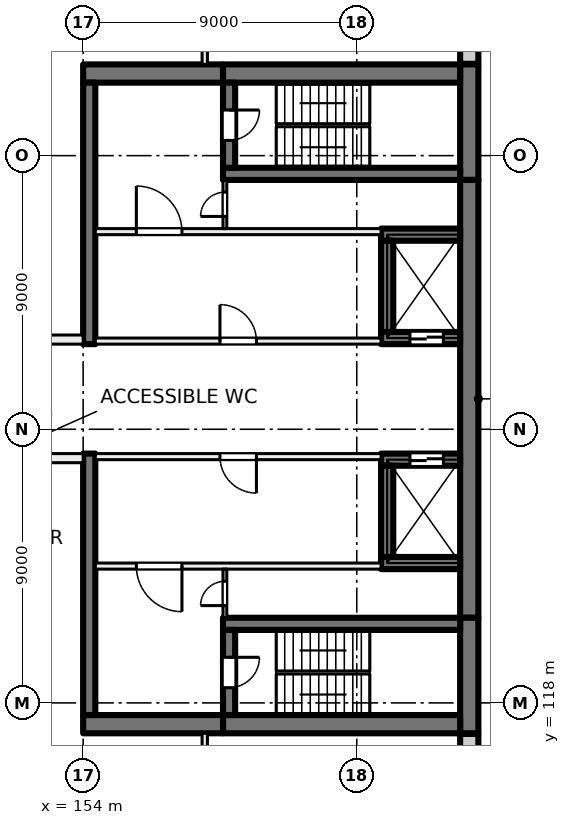
"""IFC4 building model, lengths in metres.
Left out: names, types, materials, properties, quantities, classifications, styles, units other than length and angle.
Written with IfcOpenShell. Run it as: python <this file> out.ifc"""

import sys

from ifc_helpers import new_model, si_unit, direction, frame, frame_2d, origin, place, context, subcontext, project, spatial, rectangle, extrude, element, fill, save


model = new_model("IFC4")
c1 = context("Model", 3, precision=1e-05, world=origin(), true_north=direction((0.0, 1.0)))
c2 = subcontext(c1, "Body", "Model", "MODEL_VIEW")
j1 = project(units=[si_unit("LENGTHUNIT", "METRE"), si_unit("PLANEANGLEUNIT", "RADIAN")], contexts=[c1])
p1 = place(None, origin())
s1 = spatial("IfcSite", under=j1, at=p1, CompositionType="ELEMENT")
p2 = place(p1, origin())
s2 = spatial("IfcBuilding", under=s1, at=p2, CompositionType="ELEMENT")
p3 = place(p2, frame((0.0, 0.0, 67.5)))
s3 = spatial("IfcBuildingStorey", under=s2, at=p3, CompositionType="ELEMENT", Elevation=67.5)
p4 = place(p3, frame((166.7, 139.0, 0.0), z_axis=(0.0, 0.0, 1.0), x_axis=(0.0, -1.0, 0.0)))
e1 = element("IfcWall", 1, at=p4, inside=s3, PredefinedType="SHEAR", context=c2, shape_type="SweptSolid", body=[
    extrude(rectangle(XDim=3.8, YDim=0.6, at=frame_2d((1.9, 0.0))), origin(), (0.0, 0.0, 1.0), 4.0),
])
p5 = place(p3, frame((166.7, 135.2, 0.0), z_axis=(0.0, 0.0, 1.0), x_axis=(0.0, -1.0, 0.0)))
e2 = element("IfcWall", 2, at=p5, inside=s3, PredefinedType="SHEAR", context=c2, shape_type="SweptSolid", body=[
    extrude(rectangle(XDim=14.4, YDim=0.6, at=frame_2d((7.2, 0.0))), origin(), (0.0, 0.0, 1.0), 4.0),
])
p6 = place(p3, frame((166.7, 120.8, 0.0), z_axis=(0.0, 0.0, 1.0), x_axis=(0.0, -1.0, 0.0)))
e3 = element("IfcWall", 3, at=p6, inside=s3, PredefinedType="SHEAR", context=c2, shape_type="SweptSolid", body=[
    extrude(rectangle(XDim=3.8, YDim=0.6, at=frame_2d((1.9, 0.0))), origin(), (0.0, 0.0, 1.0), 4.0),
])
for number, where, z_axis, x_axis in (
    (4, (166.4, 138.7, 0.0), (0.0, 0.0, 1.0), (-1.0, 0.0, 0.0)),
    (5, (166.4, 117.3, 0.0), (0.0, 0.0, 1.0), (-1.0, 0.0, 0.0)),
):
    element("IfcWall", number, at=place(p3, frame(where, z_axis=z_axis, x_axis=x_axis)), inside=s3, PredefinedType="SHEAR", context=c2, shape_type="SweptSolid", body=[
        extrude(rectangle(XDim=7.8, YDim=0.6, at=frame_2d((3.9, 0.0))), origin(), (0.0, 0.0, 1.0), 4.0),
    ])
for number, where, z_axis, x_axis in (
    (6, (158.6, 138.7, 0.0), (0.0, 0.0, 1.0), (-1.0, 0.0, 0.0)),
    (7, (158.6, 117.3, 0.0), (0.0, 0.0, 1.0), (-1.0, 0.0, 0.0)),
):
    element("IfcWall", number, at=place(p3, frame(where, z_axis=z_axis, x_axis=x_axis)), inside=s3, PredefinedType="SHEAR", context=c2, shape_type="SweptSolid", body=[
        extrude(rectangle(XDim=4.6, YDim=0.6, at=frame_2d((2.3, 0.0))), origin(), (0.0, 0.0, 1.0), 4.0),
    ])
p7 = place(p3, frame((166.4, 135.4, 0.0), z_axis=(0.0, 0.0, 1.0), x_axis=(-1.0, 0.0, 0.0)))
e8 = element("IfcWall", 8, at=p7, inside=s3, PredefinedType="SHEAR", context=c2, shape_type="SweptSolid", body=[
    extrude(rectangle(XDim=7.8, YDim=0.4, at=frame_2d((3.9, 0.0))), origin(), (0.0, 0.0, 1.0), 4.0),
])
p8 = place(p3, frame((158.8, 138.4, 0.0), z_axis=(0.0, 0.0, 1.0), x_axis=(0.0, -1.0, 0.0)))
e9 = element("IfcWall", 9, at=p8, inside=s3, PredefinedType="SHEAR", context=c2, shape_type="SweptSolid", body=[
    extrude(rectangle(XDim=2.8, YDim=0.4, at=frame_2d((1.4, 0.0))), origin(), (0.0, 0.0, 1.0), 4.0),
])
p9 = place(p8, frame((0.9, 0.0, 0.0)))
e10 = element("IfcOpeningElement", 10, at=p9, cuts=e9, PredefinedType="OPENING", context=c2, shape_type="SweptSolid", body=[
    extrude(rectangle(XDim=1.0, YDim=2.1, at=frame_2d((0.5, 1.05))), frame((0.0, 0.21, 0.0), z_axis=(0.0, -1.0, 0.0), x_axis=(1.0, 0.0, 0.0)), (0.0, 0.0, 1.0), 0.42),
])
p10 = place(p3, frame((166.4, 120.6, 0.0), z_axis=(0.0, 0.0, 1.0), x_axis=(-1.0, 0.0, 0.0)))
e11 = element("IfcWall", 11, at=p10, inside=s3, PredefinedType="SHEAR", context=c2, shape_type="SweptSolid", body=[
    extrude(rectangle(XDim=7.8, YDim=0.4, at=frame_2d((3.9, 0.0))), origin(), (0.0, 0.0, 1.0), 4.0),
])
p11 = place(p3, frame((158.8, 120.4, 0.0), z_axis=(0.0, 0.0, 1.0), x_axis=(0.0, -1.0, 0.0)))
e12 = element("IfcWall", 12, at=p11, inside=s3, PredefinedType="SHEAR", context=c2, shape_type="SweptSolid", body=[
    extrude(rectangle(XDim=2.8, YDim=0.4, at=frame_2d((1.4, 0.0))), origin(), (0.0, 0.0, 1.0), 4.0),
])
p12 = place(p11, frame((0.9, 0.0, 0.0)))
e13 = element("IfcOpeningElement", 13, at=p12, cuts=e12, PredefinedType="OPENING", context=c2, shape_type="SweptSolid", body=[
    extrude(rectangle(XDim=1.0, YDim=2.1, at=frame_2d((0.5, 1.05))), frame((0.0, 0.21, 0.0), z_axis=(0.0, -1.0, 0.0), x_axis=(1.0, 0.0, 0.0)), (0.0, 0.0, 1.0), 0.42),
])
p13 = place(p3, frame((166.4, 130.0, 0.0), z_axis=(0.0, 0.0, 1.0), x_axis=(-1.0, 0.0, 0.0)))
e14 = element("IfcWall", 14, at=p13, inside=s3, PredefinedType="SHEAR", context=c2, shape_type="SweptSolid", body=[
    extrude(rectangle(XDim=2.6, YDim=0.4, at=frame_2d((1.3, 0.0))), origin(), (0.0, 0.0, 1.0), 4.0),
])
p14 = place(p13, frame((0.55, 0.0, 0.0)))
e15 = element("IfcOpeningElement", 15, at=p14, cuts=e14, PredefinedType="OPENING", context=c2, shape_type="SweptSolid", body=[
    extrude(rectangle(XDim=1.1, YDim=2.1, at=frame_2d((0.55, 1.05))), frame((0.0, 0.21, 0.0), z_axis=(0.0, -1.0, 0.0), x_axis=(1.0, 0.0, 0.0)), (0.0, 0.0, 1.0), 0.42),
])
p15 = place(p3, frame((166.4, 133.4, 0.0), z_axis=(0.0, 0.0, 1.0), x_axis=(-1.0, 0.0, 0.0)))
e16 = element("IfcWall", 16, at=p15, inside=s3, PredefinedType="SHEAR", context=c2, shape_type="SweptSolid", body=[
    extrude(rectangle(XDim=2.6, YDim=0.4, at=frame_2d((1.3, 0.0))), origin(), (0.0, 0.0, 1.0), 4.0),
])
p16 = place(p3, frame((164.0, 133.2, 0.0), z_axis=(0.0, 0.0, 1.0), x_axis=(0.0, -1.0, 0.0)))
e17 = element("IfcWall", 17, at=p16, inside=s3, PredefinedType="SHEAR", context=c2, shape_type="SweptSolid", body=[
    extrude(rectangle(XDim=3.0, YDim=0.4, at=frame_2d((1.5, 0.0))), origin(), (0.0, 0.0, 1.0), 4.0),
])
p17 = place(p3, frame((166.4, 126.0, 0.0), z_axis=(0.0, 0.0, 1.0), x_axis=(-1.0, 0.0, 0.0)))
e18 = element("IfcWall", 18, at=p17, inside=s3, PredefinedType="SHEAR", context=c2, shape_type="SweptSolid", body=[
    extrude(rectangle(XDim=2.6, YDim=0.4, at=frame_2d((1.3, 0.0))), origin(), (0.0, 0.0, 1.0), 4.0),
])
p18 = place(p17, frame((0.55, 0.0, 0.0)))
e19 = element("IfcOpeningElement", 19, at=p18, cuts=e18, PredefinedType="OPENING", context=c2, shape_type="SweptSolid", body=[
    extrude(rectangle(XDim=1.1, YDim=2.1, at=frame_2d((0.55, 1.05))), frame((0.0, 0.21, 0.0), z_axis=(0.0, -1.0, 0.0), x_axis=(1.0, 0.0, 0.0)), (0.0, 0.0, 1.0), 0.42),
])
p19 = place(p3, frame((166.4, 122.6, 0.0), z_axis=(0.0, 0.0, 1.0), x_axis=(-1.0, 0.0, 0.0)))
e20 = element("IfcWall", 20, at=p19, inside=s3, PredefinedType="SHEAR", context=c2, shape_type="SweptSolid", body=[
    extrude(rectangle(XDim=2.6, YDim=0.4, at=frame_2d((1.3, 0.0))), origin(), (0.0, 0.0, 1.0), 4.0),
])
p20 = place(p3, frame((164.0, 125.8, 0.0), z_axis=(0.0, 0.0, 1.0), x_axis=(0.0, -1.0, 0.0)))
e21 = element("IfcWall", 21, at=p20, inside=s3, PredefinedType="SHEAR", context=c2, shape_type="SweptSolid", body=[
    extrude(rectangle(XDim=3.0, YDim=0.4, at=frame_2d((1.5, 0.0))), origin(), (0.0, 0.0, 1.0), 4.0),
])
for number, where, z_axis, x_axis in (
    (22, (154.2, 138.4, 0.0), (0.0, 0.0, 1.0), (0.0, -1.0, 0.0)),
    (23, (154.2, 126.2, 0.0), (0.0, 0.0, 1.0), (0.0, -1.0, 0.0)),
):
    element("IfcWall", number, at=place(p3, frame(where, z_axis=z_axis, x_axis=x_axis)), inside=s3, PredefinedType="SHEAR", context=c2, shape_type="SweptSolid", body=[
        extrude(rectangle(XDim=8.6, YDim=0.4, at=frame_2d((4.3, 0.0))), origin(), (0.0, 0.0, 1.0), 4.0),
    ])
p21 = place(p3, frame((166.7, 116.98, 0.0), z_axis=(0.0, 0.0, 1.0), x_axis=(0.0, -1.0, 0.0)))
e24 = element("IfcWall", 24, at=p21, inside=s3, PredefinedType="SOLIDWALL", context=c2, shape_type="SweptSolid", body=[
    extrude(rectangle(XDim=2.98, YDim=0.6, at=frame_2d((1.49, 0.0))), origin(), (0.0, 0.0, 1.0), 3.625),
])
p22 = place(p3, frame((166.7, 141.93, 0.0), z_axis=(0.0, 0.0, 1.0), x_axis=(0.0, -1.0, 0.0)))
e25 = element("IfcWall", 25, at=p22, inside=s3, PredefinedType="SOLIDWALL", context=c2, shape_type="SweptSolid", body=[
    extrude(rectangle(XDim=2.91, YDim=0.6, at=frame_2d((1.455, 0.0))), origin(), (0.0, 0.0, 1.0), 3.625),
])
p23 = place(p3, frame((163.8, 126.1, 0.0), z_axis=(0.0, 0.0, 1.0), x_axis=(-1.0, 0.0, 0.0)))
e26 = element("IfcWall", 26, at=p23, inside=s3, PredefinedType="PARTITIONING", context=c2, shape_type="SweptSolid", body=[
    extrude(rectangle(XDim=9.4, YDim=0.2, at=frame_2d((4.7, 0.0))), origin(), (0.0, 0.0, 1.0), 3.625),
])
p24 = place(p23, frame((4.1, 0.0, 0.0)))
e27 = element("IfcOpeningElement", 27, at=p24, cuts=e26, PredefinedType="OPENING", context=c2, shape_type="SweptSolid", body=[
    extrude(rectangle(XDim=1.2, YDim=2.1, at=frame_2d((0.6, 1.05))), frame((0.0, 0.11, 0.0), z_axis=(0.0, -1.0, 0.0), x_axis=(1.0, 0.0, 0.0)), (0.0, 0.0, 1.0), 0.22),
])
p25 = place(p3, frame((163.8, 122.5, 0.0), z_axis=(0.0, 0.0, 1.0), x_axis=(-1.0, 0.0, 0.0)))
e28 = element("IfcWall", 28, at=p25, inside=s3, PredefinedType="PARTITIONING", context=c2, shape_type="SweptSolid", body=[
    extrude(rectangle(XDim=9.4, YDim=0.2, at=frame_2d((4.7, 0.0))), origin(), (0.0, 0.0, 1.0), 3.625),
])
p26 = place(p25, frame((6.55, 0.0, 0.0)))
e29 = element("IfcOpeningElement", 29, at=p26, cuts=e28, PredefinedType="OPENING", context=c2, shape_type="SweptSolid", body=[
    extrude(rectangle(XDim=1.5, YDim=2.1, at=frame_2d((0.75, 1.05))), frame((0.0, 0.11, 0.0), z_axis=(0.0, -1.0, 0.0), x_axis=(1.0, 0.0, 0.0)), (0.0, 0.0, 1.0), 0.22),
])
p27 = place(p3, frame((158.663, 120.8, 0.0), z_axis=(0.0, 0.0, 1.0), x_axis=(0.0, 1.0, 0.0)))
e30 = element("IfcWall", 30, at=p27, inside=s3, PredefinedType="PARTITIONING", context=c2, shape_type="SweptSolid", body=[
    extrude(rectangle(XDim=1.6, YDim=0.125, at=frame_2d((0.8, 0.0))), origin(), (0.0, 0.0, 1.0), 3.625),
])
p28 = place(p27, frame((0.4, 0.0, 0.0)))
e31 = element("IfcOpeningElement", 31, at=p28, cuts=e30, PredefinedType="OPENING", context=c2, shape_type="SweptSolid", body=[
    extrude(rectangle(XDim=0.8, YDim=2.1, at=frame_2d((0.4, 1.05))), frame((0.0, 0.073, 0.0), z_axis=(0.0, -1.0, 0.0), x_axis=(1.0, 0.0, 0.0)), (0.0, 0.0, 1.0), 0.145),
])
p29 = place(p3, frame((154.4, 129.9, 0.0), z_axis=(0.0, 0.0, 1.0), x_axis=(1.0, 0.0, 0.0)))
e32 = element("IfcWall", 32, at=p29, inside=s3, PredefinedType="PARTITIONING", context=c2, shape_type="SweptSolid", body=[
    extrude(rectangle(XDim=9.4, YDim=0.2, at=frame_2d((4.7, 0.0))), origin(), (0.0, 0.0, 1.0), 3.625),
])
p30 = place(p29, frame((4.1, 0.0, 0.0)))
e33 = element("IfcOpeningElement", 33, at=p30, cuts=e32, PredefinedType="OPENING", context=c2, shape_type="SweptSolid", body=[
    extrude(rectangle(XDim=1.2, YDim=2.1, at=frame_2d((0.6, 1.05))), frame((0.0, 0.11, 0.0), z_axis=(0.0, -1.0, 0.0), x_axis=(1.0, 0.0, 0.0)), (0.0, 0.0, 1.0), 0.22),
])
p31 = place(p3, frame((154.4, 133.5, 0.0), z_axis=(0.0, 0.0, 1.0), x_axis=(1.0, 0.0, 0.0)))
e34 = element("IfcWall", 34, at=p31, inside=s3, PredefinedType="PARTITIONING", context=c2, shape_type="SweptSolid", body=[
    extrude(rectangle(XDim=9.4, YDim=0.2, at=frame_2d((4.7, 0.0))), origin(), (0.0, 0.0, 1.0), 3.625),
])
p32 = place(p31, frame((1.35, 0.0, 0.0)))
e35 = element("IfcOpeningElement", 35, at=p32, cuts=e34, PredefinedType="OPENING", context=c2, shape_type="SweptSolid", body=[
    extrude(rectangle(XDim=1.5, YDim=2.1, at=frame_2d((0.75, 1.05))), frame((0.0, 0.11, 0.0), z_axis=(0.0, -1.0, 0.0), x_axis=(1.0, 0.0, 0.0)), (0.0, 0.0, 1.0), 0.22),
])
p33 = place(p3, frame((158.663, 133.6, 0.0), z_axis=(0.0, 0.0, 1.0), x_axis=(0.0, 1.0, 0.0)))
e36 = element("IfcWall", 36, at=p33, inside=s3, PredefinedType="PARTITIONING", context=c2, shape_type="SweptSolid", body=[
    extrude(rectangle(XDim=1.6, YDim=0.125, at=frame_2d((0.8, 0.0))), origin(), (0.0, 0.0, 1.0), 3.625),
])
p34 = place(p33, frame((0.4, 0.0, 0.0)))
e37 = element("IfcOpeningElement", 37, at=p34, cuts=e36, PredefinedType="OPENING", context=c2, shape_type="SweptSolid", body=[
    extrude(rectangle(XDim=0.8, YDim=2.1, at=frame_2d((0.4, 1.05))), frame((0.0, 0.073, 0.0), z_axis=(0.0, -1.0, 0.0), x_axis=(1.0, 0.0, 0.0)), (0.0, 0.0, 1.0), 0.145),
])
p35 = place(p3, frame((140.0, 129.95, 0.0), z_axis=(0.0, 0.0, 1.0), x_axis=(1.0, 0.0, 0.0)))
e38 = element("IfcWall", 38, at=p35, inside=s3, PredefinedType="PARTITIONING", context=c2, shape_type="SweptSolid", body=[
    extrude(rectangle(XDim=14.0, YDim=0.3, at=frame_2d((7.0, 0.0))), origin(), (0.0, 0.0, 1.0), 3.625),
])
p36 = place(p35, frame((6.1, 0.0, 0.0)))
e39 = element("IfcOpeningElement", 39, at=p36, cuts=e38, PredefinedType="OPENING", context=c2, shape_type="SweptSolid", body=[
    extrude(rectangle(XDim=1.8, YDim=2.1, at=frame_2d((0.9, 1.05))), frame((0.0, 0.16, 0.0), z_axis=(0.0, -1.0, 0.0), x_axis=(1.0, 0.0, 0.0)), (0.0, 0.0, 1.0), 0.32),
])
p37 = place(p3, frame((154.0, 126.05, 0.0), z_axis=(0.0, 0.0, 1.0), x_axis=(-1.0, 0.0, 0.0)))
e40 = element("IfcWall", 40, at=p37, inside=s3, PredefinedType="PARTITIONING", context=c2, shape_type="SweptSolid", body=[
    extrude(rectangle(XDim=14.0, YDim=0.3, at=frame_2d((7.0, 0.0))), origin(), (0.0, 0.0, 1.0), 3.625),
])
p38 = place(p37, frame((10.25, 0.0, 0.0)))
e41 = element("IfcOpeningElement", 41, at=p38, cuts=e40, PredefinedType="OPENING", context=c2, shape_type="SweptSolid", body=[
    extrude(rectangle(XDim=1.0, YDim=2.1, at=frame_2d((0.5, 1.05))), frame((0.0, 0.16, 0.0), z_axis=(0.0, -1.0, 0.0), x_axis=(1.0, 0.0, 0.0)), (0.0, 0.0, 1.0), 0.32),
])
p39 = place(p37, frame((1.6, 0.0, 0.0)))
e42 = element("IfcOpeningElement", 42, at=p39, cuts=e40, PredefinedType="OPENING", context=c2, shape_type="SweptSolid", body=[
    extrude(rectangle(XDim=1.8, YDim=2.1, at=frame_2d((0.9, 1.05))), frame((0.0, 0.16, 0.0), z_axis=(0.0, -1.0, 0.0), x_axis=(1.0, 0.0, 0.0)), (0.0, 0.0, 1.0), 0.32),
])
p40 = place(p3, frame((158.0, 110.6, 0.0), z_axis=(0.0, 0.0, 1.0), x_axis=(0.0, 1.0, 0.0)))
e43 = element("IfcWall", 43, at=p40, inside=s3, PredefinedType="PARTITIONING", context=c2, shape_type="SweptSolid", body=[
    extrude(rectangle(XDim=6.4, YDim=0.175, at=frame_2d((3.2, 0.0))), origin(), (0.0, 0.0, 1.0), 3.625),
])
p41 = place(p40, frame((2.6, 0.0, 0.0)))
e44 = element("IfcOpeningElement", 44, at=p41, cuts=e43, PredefinedType="OPENING", context=c2, shape_type="SweptSolid", body=[
    extrude(rectangle(XDim=1.2, YDim=2.1, at=frame_2d((0.6, 1.05))), frame((0.0, 0.097, 0.0), z_axis=(0.0, -1.0, 0.0), x_axis=(1.0, 0.0, 0.0)), (0.0, 0.0, 1.0), 0.195),
])
p42 = place(p3, frame((158.0, 139.0, 0.0), z_axis=(0.0, 0.0, 1.0), x_axis=(0.0, 1.0, 0.0)))
e45 = element("IfcWall", 45, at=p42, inside=s3, PredefinedType="PARTITIONING", context=c2, shape_type="SweptSolid", body=[
    extrude(rectangle(XDim=6.4, YDim=0.175, at=frame_2d((3.2, 0.0))), origin(), (0.0, 0.0, 1.0), 3.625),
])
p43 = place(p42, frame((2.6, 0.0, 0.0)))
e46 = element("IfcOpeningElement", 46, at=p43, cuts=e45, PredefinedType="OPENING", context=c2, shape_type="SweptSolid", body=[
    extrude(rectangle(XDim=1.2, YDim=2.1, at=frame_2d((0.6, 1.05))), frame((0.0, 0.097, 0.0), z_axis=(0.0, -1.0, 0.0), x_axis=(1.0, 0.0, 0.0)), (0.0, 0.0, 1.0), 0.195),
])
p44 = place(p18, origin())
e47 = element("IfcDoor", 47, at=p44, inside=s3, OperationType="DOUBLE_DOOR_SLIDING", PredefinedType="DOOR", context=c2, shape_type="SweptSolid", body=[
    extrude(rectangle(XDim=1.1, YDim=2.1, at=frame_2d((0.55, 1.05))), frame((0.0, 0.025, 0.0), z_axis=(0.0, -1.0, 0.0), x_axis=(1.0, 0.0, 0.0)), (0.0, 0.0, 1.0), 0.05),
])
fill(e19, e47)
p45 = place(p14, origin())
e48 = element("IfcDoor", 48, at=p45, inside=s3, OperationType="DOUBLE_DOOR_SLIDING", PredefinedType="DOOR", context=c2, shape_type="SweptSolid", body=[
    extrude(rectangle(XDim=1.1, YDim=2.1, at=frame_2d((0.55, 1.05))), frame((0.0, 0.025, 0.0), z_axis=(0.0, -1.0, 0.0), x_axis=(1.0, 0.0, 0.0)), (0.0, 0.0, 1.0), 0.05),
])
fill(e15, e48)
p46 = place(p24, origin())
e49 = element("IfcDoor", 49, at=p46, inside=s3, OperationType="DOUBLE_DOOR_SINGLE_SWING", PredefinedType="DOOR", context=c2, shape_type="SweptSolid", body=[
    extrude(rectangle(XDim=1.2, YDim=2.1, at=frame_2d((0.6, 1.05))), frame((0.0, 0.025, 0.0), z_axis=(0.0, -1.0, 0.0), x_axis=(1.0, 0.0, 0.0)), (0.0, 0.0, 1.0), 0.05),
])
fill(e27, e49)
p47 = place(p26, origin())
e50 = element("IfcDoor", 50, at=p47, inside=s3, OperationType="DOUBLE_DOOR_SINGLE_SWING", PredefinedType="DOOR", context=c2, shape_type="SweptSolid", body=[
    extrude(rectangle(XDim=1.5, YDim=2.1, at=frame_2d((0.75, 1.05))), frame((0.0, 0.025, 0.0), z_axis=(0.0, -1.0, 0.0), x_axis=(1.0, 0.0, 0.0)), (0.0, 0.0, 1.0), 0.05),
])
fill(e29, e50)
p48 = place(p12, origin())
e51 = element("IfcDoor", 51, at=p48, inside=s3, OperationType="SINGLE_SWING_LEFT", PredefinedType="DOOR", context=c2, shape_type="SweptSolid", body=[
    extrude(rectangle(XDim=1.0, YDim=2.1, at=frame_2d((0.5, 1.05))), frame((0.0, 0.025, 0.0), z_axis=(0.0, -1.0, 0.0), x_axis=(1.0, 0.0, 0.0)), (0.0, 0.0, 1.0), 0.05),
])
fill(e13, e51)
p49 = place(p28, origin())
e52 = element("IfcDoor", 52, at=p49, inside=s3, OperationType="SINGLE_SWING_RIGHT", PredefinedType="DOOR", context=c2, shape_type="SweptSolid", body=[
    extrude(rectangle(XDim=0.8, YDim=2.1, at=frame_2d((0.4, 1.05))), frame((0.0, 0.025, 0.0), z_axis=(0.0, -1.0, 0.0), x_axis=(1.0, 0.0, 0.0)), (0.0, 0.0, 1.0), 0.05),
])
fill(e31, e52)
p50 = place(p30, origin())
e53 = element("IfcDoor", 53, at=p50, inside=s3, OperationType="DOUBLE_DOOR_SINGLE_SWING", PredefinedType="DOOR", context=c2, shape_type="SweptSolid", body=[
    extrude(rectangle(XDim=1.2, YDim=2.1, at=frame_2d((0.6, 1.05))), frame((0.0, 0.025, 0.0), z_axis=(0.0, -1.0, 0.0), x_axis=(1.0, 0.0, 0.0)), (0.0, 0.0, 1.0), 0.05),
])
fill(e33, e53)
p51 = place(p32, origin())
e54 = element("IfcDoor", 54, at=p51, inside=s3, OperationType="DOUBLE_DOOR_SINGLE_SWING", PredefinedType="DOOR", context=c2, shape_type="SweptSolid", body=[
    extrude(rectangle(XDim=1.5, YDim=2.1, at=frame_2d((0.75, 1.05))), frame((0.0, 0.025, 0.0), z_axis=(0.0, -1.0, 0.0), x_axis=(1.0, 0.0, 0.0)), (0.0, 0.0, 1.0), 0.05),
])
fill(e35, e54)
p52 = place(p9, origin())
e55 = element("IfcDoor", 55, at=p52, inside=s3, OperationType="SINGLE_SWING_RIGHT", PredefinedType="DOOR", context=c2, shape_type="SweptSolid", body=[
    extrude(rectangle(XDim=1.0, YDim=2.1, at=frame_2d((0.5, 1.05))), frame((0.0, 0.025, 0.0), z_axis=(0.0, -1.0, 0.0), x_axis=(1.0, 0.0, 0.0)), (0.0, 0.0, 1.0), 0.05),
])
fill(e10, e55)
p53 = place(p34, origin())
e56 = element("IfcDoor", 56, at=p53, inside=s3, OperationType="SINGLE_SWING_LEFT", PredefinedType="DOOR", context=c2, shape_type="SweptSolid", body=[
    extrude(rectangle(XDim=0.8, YDim=2.1, at=frame_2d((0.4, 1.05))), frame((0.0, 0.025, 0.0), z_axis=(0.0, -1.0, 0.0), x_axis=(1.0, 0.0, 0.0)), (0.0, 0.0, 1.0), 0.05),
])
fill(e37, e56)
save(model, sys.argv[1])
